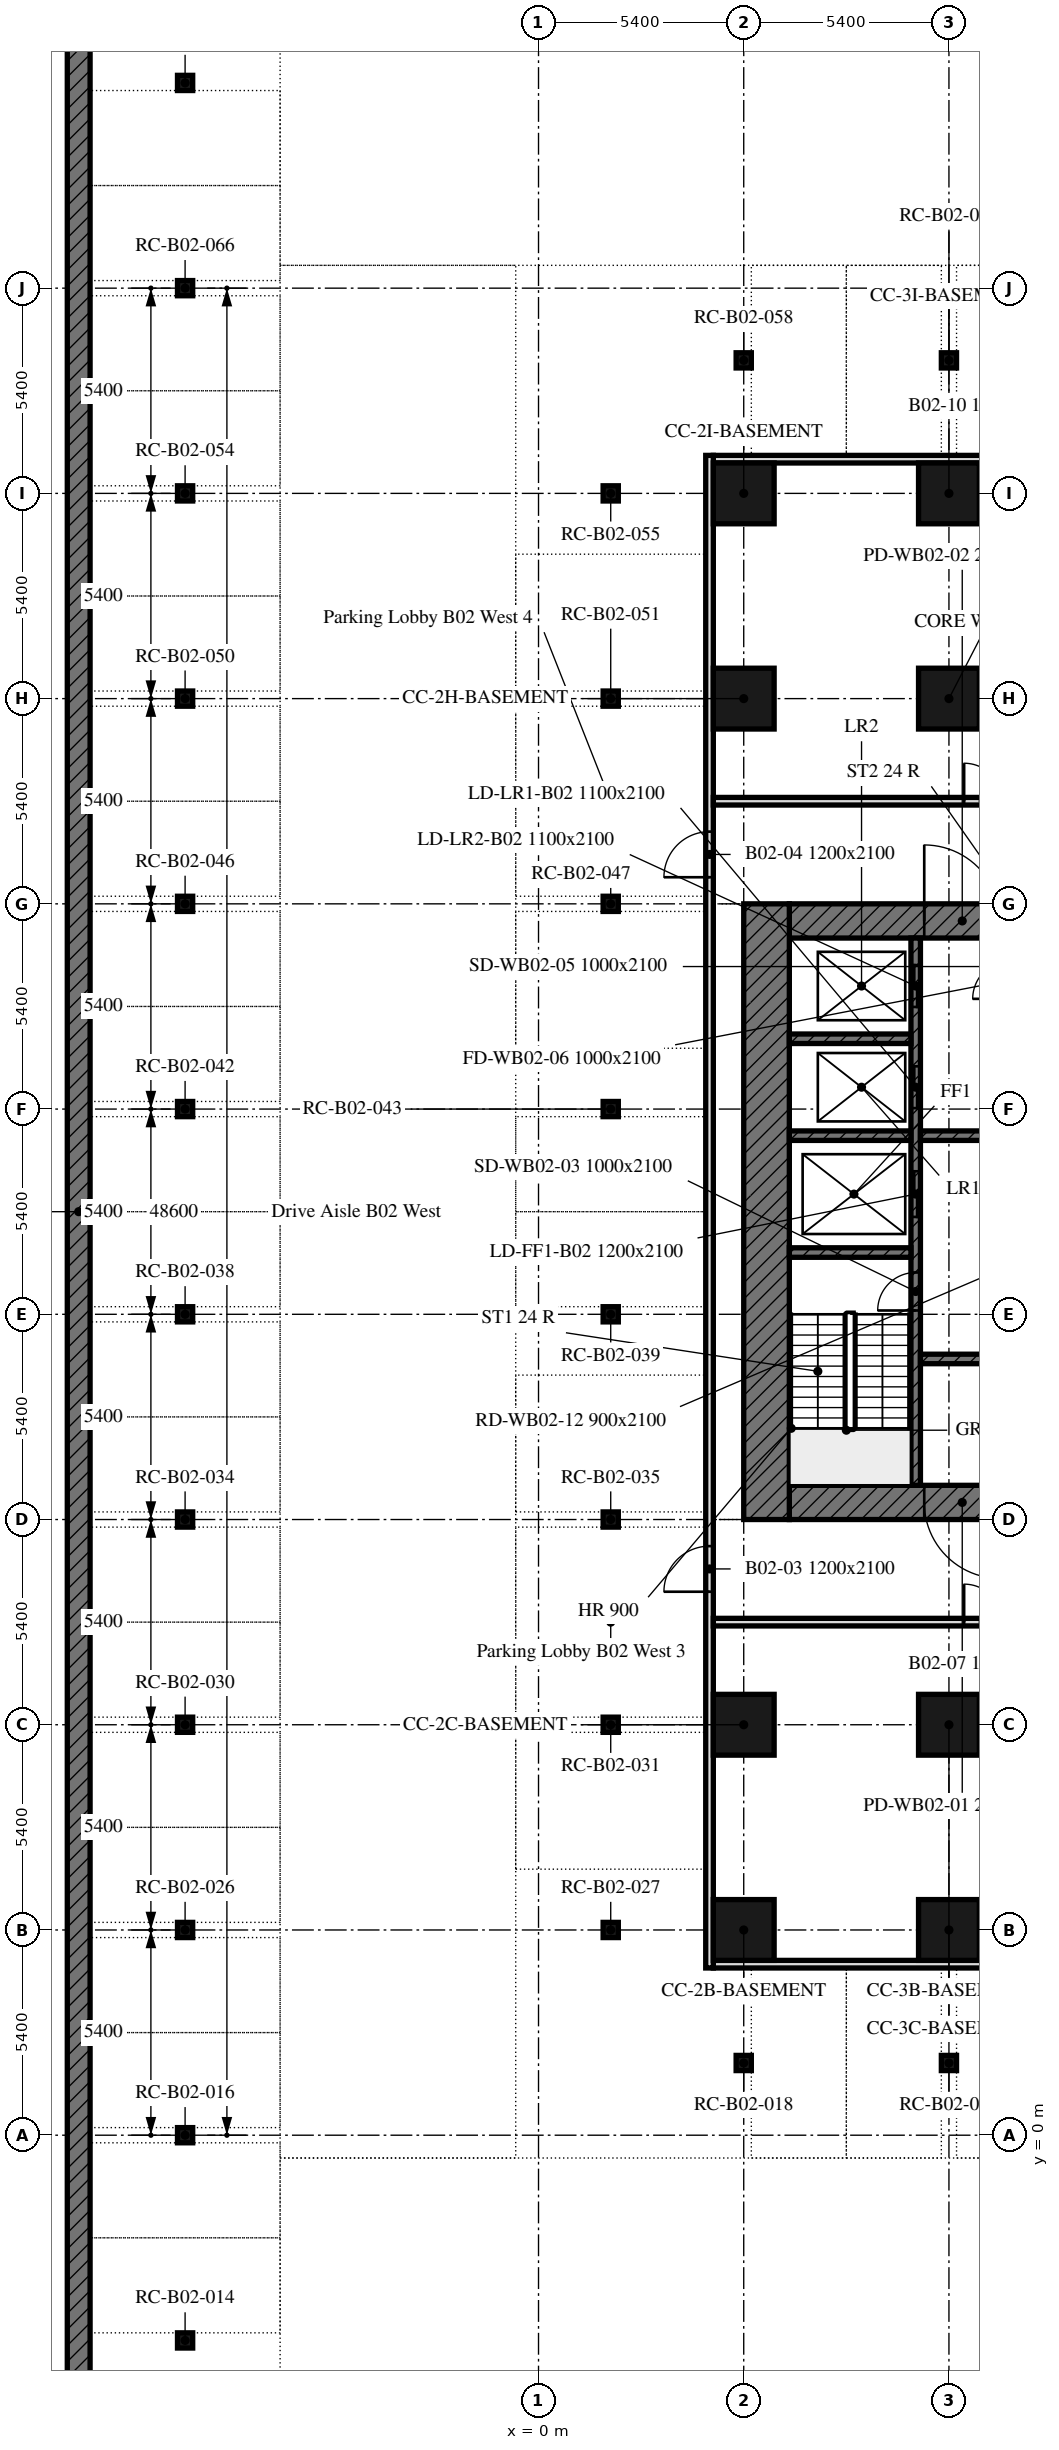
"""IFC4 building model, lengths in metres.
Left out: names, types, materials, properties, quantities, classifications, styles, units other than length and angle.
Written with IfcOpenShell. Run it as: python <this file> out.ifc"""

import sys

from ifc_helpers import new_model, si_unit, direction, frame, frame_2d, origin, origin_2d, place, context, subcontext, project, spatial, rectangle, extrude, element, fill, save


model = new_model("IFC4")
c1 = context("Model", 3, precision=1e-05, world=origin(), true_north=direction((0.0, 1.0)))
c2 = subcontext(c1, "Body", "Model", "MODEL_VIEW")
j1 = project(units=[si_unit("LENGTHUNIT", "METRE"), si_unit("PLANEANGLEUNIT", "RADIAN")], contexts=[c1])
p1 = place(None, origin())
s1 = spatial("IfcSite", under=j1, at=p1, CompositionType="ELEMENT")
p2 = place(p1, origin())
s2 = spatial("IfcBuilding", under=s1, at=p2, CompositionType="ELEMENT")
p3 = place(p2, frame((0.0, 0.0, -9.0)))
s3 = spatial("IfcBuildingStorey", under=s2, at=p3, CompositionType="ELEMENT", Elevation=-9.0)
p4 = place(p3, frame((-12.1, -12.4, 0.0), z_axis=(0.0, 0.0, 1.0), x_axis=(0.0, 1.0, 0.0)))
e1 = element("IfcWall", 1, at=p4, inside=s3, PredefinedType="SOLIDWALL", context=c2, shape_type="SweptSolid", body=[
    extrude(rectangle(XDim=73.4, YDim=0.6, at=frame_2d((36.7, 0.0))), origin(), (0.0, 0.0, 1.0), 4.1),
])
for number, where, z_axis, x_axis in (
    (2, (5.4, 5.4, 0.0), (0.0, 0.0, 1.0), (1.0, 0.0, 0.0)),
    (3, (10.8, 5.4, 0.0), (0.0, 0.0, 1.0), (1.0, 0.0, 0.0)),
    (4, (5.4, 10.8, 0.0), (0.0, 0.0, 1.0), (1.0, 0.0, 0.0)),
    (5, (10.8, 10.8, 0.0), (0.0, 0.0, 1.0), (1.0, 0.0, 0.0)),
    (6, (5.4, 37.8, 0.0), (0.0, 0.0, 1.0), (1.0, 0.0, 0.0)),
    (7, (10.8, 37.8, 0.0), (0.0, 0.0, 1.0), (1.0, 0.0, 0.0)),
    (8, (5.4, 43.2, 0.0), (0.0, 0.0, 1.0), (1.0, 0.0, 0.0)),
    (9, (10.8, 43.2, 0.0), (0.0, 0.0, 1.0), (1.0, 0.0, 0.0)),
):
    element("IfcColumn", number, at=place(p3, frame(where, z_axis=z_axis, x_axis=x_axis)), inside=s3, PredefinedType="COLUMN", context=c2, shape_type="SweptSolid", body=[
        extrude(rectangle(XDim=1.6, YDim=1.6, at=origin_2d()), origin(), (0.0, 0.0, 1.0), 4.1),
    ])
for number, where, z_axis, x_axis in (
    (10, (-9.3, -5.4, 0.0), (0.0, 0.0, 1.0), (1.0, 0.0, 0.0)),
    (11, (-9.3, 0.0, 0.0), (0.0, 0.0, 1.0), (1.0, 0.0, 0.0)),
    (12, (5.4, 1.9, 0.0), (0.0, 0.0, 1.0), (1.0, 0.0, 0.0)),
    (13, (10.8, 1.9, 0.0), (0.0, 0.0, 1.0), (1.0, 0.0, 0.0)),
    (14, (-9.3, 5.4, 0.0), (0.0, 0.0, 1.0), (1.0, 0.0, 0.0)),
    (15, (1.9, 5.4, 0.0), (0.0, 0.0, 1.0), (1.0, 0.0, 0.0)),
    (16, (-9.3, 10.8, 0.0), (0.0, 0.0, 1.0), (1.0, 0.0, 0.0)),
    (17, (1.9, 10.8, 0.0), (0.0, 0.0, 1.0), (1.0, 0.0, 0.0)),
    (18, (-9.3, 16.2, 0.0), (0.0, 0.0, 1.0), (1.0, 0.0, 0.0)),
    (19, (1.9, 16.2, 0.0), (0.0, 0.0, 1.0), (1.0, 0.0, 0.0)),
    (20, (-9.3, 21.6, 0.0), (0.0, 0.0, 1.0), (1.0, 0.0, 0.0)),
    (21, (1.9, 21.6, 0.0), (0.0, 0.0, 1.0), (1.0, 0.0, 0.0)),
    (22, (-9.3, 27.0, 0.0), (0.0, 0.0, 1.0), (1.0, 0.0, 0.0)),
    (23, (1.9, 27.0, 0.0), (0.0, 0.0, 1.0), (1.0, 0.0, 0.0)),
    (24, (-9.3, 32.4, 0.0), (0.0, 0.0, 1.0), (1.0, 0.0, 0.0)),
    (25, (1.9, 32.4, 0.0), (0.0, 0.0, 1.0), (1.0, 0.0, 0.0)),
    (26, (-9.3, 37.8, 0.0), (0.0, 0.0, 1.0), (1.0, 0.0, 0.0)),
    (27, (1.9, 37.8, 0.0), (0.0, 0.0, 1.0), (1.0, 0.0, 0.0)),
    (28, (-9.3, 43.2, 0.0), (0.0, 0.0, 1.0), (1.0, 0.0, 0.0)),
    (29, (1.9, 43.2, 0.0), (0.0, 0.0, 1.0), (1.0, 0.0, 0.0)),
    (30, (5.4, 46.7, 0.0), (0.0, 0.0, 1.0), (1.0, 0.0, 0.0)),
    (31, (10.8, 46.7, 0.0), (0.0, 0.0, 1.0), (1.0, 0.0, 0.0)),
    (32, (-9.3, 48.6, 0.0), (0.0, 0.0, 1.0), (1.0, 0.0, 0.0)),
    (33, (-9.3, 54.0, 0.0), (0.0, 0.0, 1.0), (1.0, 0.0, 0.0)),
):
    element("IfcColumn", number, at=place(p3, frame(where, z_axis=z_axis, x_axis=x_axis)), inside=s3, PredefinedType="COLUMN", context=c2, shape_type="SweptSolid", body=[
        extrude(rectangle(XDim=0.4, YDim=0.4, at=origin_2d()), origin(), (0.0, 0.0, 1.0), 4.1),
    ])
p5 = place(p3, frame((4.6, 4.5, 0.0), z_axis=(0.0, 0.0, 1.0), x_axis=(1.0, 0.0, 0.0)))
e34 = element("IfcWall", 34, at=p5, inside=s3, PredefinedType="PARTITIONING", context=c2, shape_type="SweptSolid", body=[
    extrude(rectangle(XDim=39.4, YDim=0.2, at=frame_2d((19.7, 0.0))), origin(), (0.0, 0.0, 1.0), 4.1),
])
p6 = place(p5, frame((18.3, 0.0, 0.0)))
e35 = element("IfcOpeningElement", 35, at=p6, cuts=e34, PredefinedType="OPENING", context=c2, shape_type="SweptSolid", body=[
    extrude(rectangle(XDim=1.2, YDim=2.1, at=frame_2d((0.6, 1.05))), frame((0.0, 0.11, 0.0), z_axis=(0.0, -1.0, 0.0), x_axis=(1.0, 0.0, 0.0)), (0.0, 0.0, 1.0), 0.22),
])
p7 = place(p3, frame((4.6, 44.1, 0.0), z_axis=(0.0, 0.0, 1.0), x_axis=(1.0, 0.0, 0.0)))
e36 = element("IfcWall", 36, at=p7, inside=s3, PredefinedType="PARTITIONING", context=c2, shape_type="SweptSolid", body=[
    extrude(rectangle(XDim=39.4, YDim=0.2, at=frame_2d((19.7, 0.0))), origin(), (0.0, 0.0, 1.0), 4.1),
])
p8 = place(p7, frame((23.4, 0.0, 0.0)))
e37 = element("IfcOpeningElement", 37, at=p8, cuts=e36, PredefinedType="OPENING", context=c2, shape_type="SweptSolid", body=[
    extrude(rectangle(XDim=1.2, YDim=2.1, at=frame_2d((0.6, 1.05))), frame((0.0, 0.11, 0.0), z_axis=(0.0, -1.0, 0.0), x_axis=(1.0, 0.0, 0.0)), (0.0, 0.0, 1.0), 0.22),
])
p9 = place(p3, frame((4.5, 4.4, 0.0), z_axis=(0.0, 0.0, 1.0), x_axis=(0.0, 1.0, 0.0)))
e38 = element("IfcWall", 38, at=p9, inside=s3, PredefinedType="PARTITIONING", context=c2, shape_type="SweptSolid", body=[
    extrude(rectangle(XDim=39.8, YDim=0.2, at=frame_2d((19.9, 0.0))), origin(), (0.0, 0.0, 1.0), 4.1),
])
p10 = place(p9, frame((9.9, 0.0, 0.0)))
e39 = element("IfcOpeningElement", 39, at=p10, cuts=e38, PredefinedType="OPENING", context=c2, shape_type="SweptSolid", body=[
    extrude(rectangle(XDim=1.2, YDim=2.1, at=frame_2d((0.6, 1.05))), frame((0.0, 0.11, 0.0), z_axis=(0.0, -1.0, 0.0), x_axis=(1.0, 0.0, 0.0)), (0.0, 0.0, 1.0), 0.22),
])
p11 = place(p9, frame((28.7, 0.0, 0.0)))
e40 = element("IfcOpeningElement", 40, at=p11, cuts=e38, PredefinedType="OPENING", context=c2, shape_type="SweptSolid", body=[
    extrude(rectangle(XDim=1.2, YDim=2.1, at=frame_2d((0.6, 1.05))), frame((0.0, 0.11, 0.0), z_axis=(0.0, -1.0, 0.0), x_axis=(1.0, 0.0, 0.0)), (0.0, 0.0, 1.0), 0.22),
])
p12 = place(p3, frame((4.6, 13.5, 0.0), z_axis=(0.0, 0.0, 1.0), x_axis=(1.0, 0.0, 0.0)))
e41 = element("IfcWall", 41, at=p12, inside=s3, PredefinedType="PARTITIONING", context=c2, shape_type="SweptSolid", body=[
    extrude(rectangle(XDim=14.2, YDim=0.2, at=frame_2d((7.1, 0.0))), origin(), (0.0, 0.0, 1.0), 4.1),
])
p13 = place(p12, frame((6.6, 0.0, 0.0)))
e42 = element("IfcOpeningElement", 42, at=p13, cuts=e41, PredefinedType="OPENING", context=c2, shape_type="SweptSolid", body=[
    extrude(rectangle(XDim=1.0, YDim=2.1, at=frame_2d((0.5, 1.05))), frame((0.0, 0.11, 0.0), z_axis=(0.0, -1.0, 0.0), x_axis=(1.0, 0.0, 0.0)), (0.0, 0.0, 1.0), 0.22),
])
p14 = place(p3, frame((4.6, 35.1, 0.0), z_axis=(0.0, 0.0, 1.0), x_axis=(1.0, 0.0, 0.0)))
e43 = element("IfcWall", 43, at=p14, inside=s3, PredefinedType="PARTITIONING", context=c2, shape_type="SweptSolid", body=[
    extrude(rectangle(XDim=14.2, YDim=0.2, at=frame_2d((7.1, 0.0))), origin(), (0.0, 0.0, 1.0), 4.1),
])
p15 = place(p14, frame((6.6, 0.0, 0.0)))
e44 = element("IfcOpeningElement", 44, at=p15, cuts=e43, PredefinedType="OPENING", context=c2, shape_type="SweptSolid", body=[
    extrude(rectangle(XDim=1.0, YDim=2.1, at=frame_2d((0.5, 1.05))), frame((0.0, 0.11, 0.0), z_axis=(0.0, -1.0, 0.0), x_axis=(1.0, 0.0, 0.0)), (0.0, 0.0, 1.0), 0.22),
])
p16 = place(p3, frame((17.7, 16.65, 0.0), z_axis=(0.0, 0.0, 1.0), x_axis=(-1.0, 0.0, 0.0)))
e45 = element("IfcWall", 45, at=p16, inside=s3, PredefinedType="SOLIDWALL", context=c2, shape_type="SweptSolid", body=[
    extrude(rectangle(XDim=11.1, YDim=0.9, at=frame_2d((5.55, 0.0))), origin(), (0.0, 0.0, 1.0), 4.1),
])
p17 = place(p16, frame((5.55, 0.0, 0.0)))
e46 = element("IfcOpeningElement", 46, at=p17, cuts=e45, PredefinedType="OPENING", context=c2, shape_type="SweptSolid", body=[
    extrude(rectangle(XDim=2.0, YDim=2.4, at=frame_2d((1.0, 1.2))), frame((0.0, 0.45, 0.0), z_axis=(0.0, -1.0, 0.0), x_axis=(1.0, 0.0, 0.0)), (0.0, 0.0, 1.0), 0.9),
])
p18 = place(p3, frame((6.6, 31.95, 0.0), z_axis=(0.0, 0.0, 1.0), x_axis=(1.0, 0.0, 0.0)))
e47 = element("IfcWall", 47, at=p18, inside=s3, PredefinedType="SOLIDWALL", context=c2, shape_type="SweptSolid", body=[
    extrude(rectangle(XDim=11.1, YDim=0.9, at=frame_2d((5.55, 0.0))), origin(), (0.0, 0.0, 1.0), 4.1),
])
p19 = place(p18, frame((3.55, 0.0, 0.0)))
e48 = element("IfcOpeningElement", 48, at=p19, cuts=e47, PredefinedType="OPENING", context=c2, shape_type="SweptSolid", body=[
    extrude(rectangle(XDim=2.0, YDim=2.4, at=frame_2d((1.0, 1.2))), frame((0.0, 0.45, 0.0), z_axis=(0.0, -1.0, 0.0), x_axis=(1.0, 0.0, 0.0)), (0.0, 0.0, 1.0), 0.9),
])
p20 = place(p3, frame((6.0, 16.2, 0.0), z_axis=(0.0, 0.0, 1.0), x_axis=(0.0, 1.0, 0.0)))
e49 = element("IfcWall", 49, at=p20, inside=s3, PredefinedType="SOLIDWALL", context=c2, shape_type="SweptSolid", body=[
    extrude(rectangle(XDim=16.2, YDim=1.2, at=frame_2d((8.1, 0.0))), origin(), (0.0, 0.0, 1.0), 4.1),
])
p21 = place(p3, frame((9.925, 17.1, 0.0), z_axis=(0.0, 0.0, 1.0), x_axis=(0.0, 1.0, 0.0)))
e50 = element("IfcWall", 50, at=p21, inside=s3, PredefinedType="SOLIDWALL", context=c2, shape_type="SweptSolid", body=[
    extrude(rectangle(XDim=14.4, YDim=0.25, at=frame_2d((7.2, 0.0))), origin(), (0.0, 0.0, 1.0), 4.1),
])
p22 = place(p21, frame((4.6, 0.0, 0.0)))
e51 = element("IfcOpeningElement", 51, at=p22, cuts=e50, PredefinedType="OPENING", context=c2, shape_type="SweptSolid", body=[
    extrude(rectangle(XDim=1.0, YDim=2.1, at=frame_2d((0.5, 1.05))), frame((0.0, 0.125, 0.0), z_axis=(0.0, -1.0, 0.0), x_axis=(1.0, 0.0, 0.0)), (0.0, 0.0, 1.0), 0.25),
])
p23 = place(p21, frame((7.062, 0.0, 0.0)))
e52 = element("IfcOpeningElement", 52, at=p23, cuts=e50, PredefinedType="OPENING", context=c2, shape_type="SweptSolid", body=[
    extrude(rectangle(XDim=1.2, YDim=2.1, at=frame_2d((0.6, 1.05))), frame((0.0, 0.125, 0.0), z_axis=(0.0, -1.0, 0.0), x_axis=(1.0, 0.0, 0.0)), (0.0, 0.0, 1.0), 0.25),
])
p24 = place(p21, frame((9.925, 0.0, 0.0)))
e53 = element("IfcOpeningElement", 53, at=p24, cuts=e50, PredefinedType="OPENING", context=c2, shape_type="SweptSolid", body=[
    extrude(rectangle(XDim=1.1, YDim=2.1, at=frame_2d((0.55, 1.05))), frame((0.0, 0.125, 0.0), z_axis=(0.0, -1.0, 0.0), x_axis=(1.0, 0.0, 0.0)), (0.0, 0.0, 1.0), 0.25),
])
p25 = place(p21, frame((12.587, 0.0, 0.0)))
e54 = element("IfcOpeningElement", 54, at=p25, cuts=e50, PredefinedType="OPENING", context=c2, shape_type="SweptSolid", body=[
    extrude(rectangle(XDim=1.1, YDim=2.1, at=frame_2d((0.55, 1.05))), frame((0.0, 0.125, 0.0), z_axis=(0.0, -1.0, 0.0), x_axis=(1.0, 0.0, 0.0)), (0.0, 0.0, 1.0), 0.25),
])
for number, where, z_axis, x_axis in (
    (55, (6.6, 23.225, 0.0), (0.0, 0.0, 1.0), (1.0, 0.0, 0.0)),
    (56, (6.6, 26.3, 0.0), (0.0, 0.0, 1.0), (1.0, 0.0, 0.0)),
):
    element("IfcWall", number, at=place(p3, frame(where, z_axis=z_axis, x_axis=x_axis)), inside=s3, PredefinedType="SOLIDWALL", context=c2, shape_type="SweptSolid", body=[
        extrude(rectangle(XDim=3.2, YDim=0.25, at=frame_2d((1.6, 0.0))), origin(), (0.0, 0.0, 1.0), 4.1),
    ])
for number, where, z_axis, x_axis in (
    (57, (10.05, 26.3, 0.0), (0.0, 0.0, 1.0), (1.0, 0.0, 0.0)),
    (58, (10.05, 20.425, 0.0), (0.0, 0.0, 1.0), (1.0, 0.0, 0.0)),
):
    element("IfcWall", number, at=place(p3, frame(where, z_axis=z_axis, x_axis=x_axis)), inside=s3, PredefinedType="SOLIDWALL", context=c2, shape_type="SweptSolid", body=[
        extrude(rectangle(XDim=2.75, YDim=0.25, at=frame_2d((1.375, 0.0))), origin(), (0.0, 0.0, 1.0), 4.1),
    ])
p26 = place(p3, frame((6.6, 28.85, 0.0), z_axis=(0.0, 0.0, 1.0), x_axis=(1.0, 0.0, 0.0)))
e59 = element("IfcWall", 59, at=p26, inside=s3, PredefinedType="SOLIDWALL", context=c2, shape_type="SweptSolid", body=[
    extrude(rectangle(XDim=3.2, YDim=0.25, at=frame_2d((1.6, 0.0))), origin(), (0.0, 0.0, 1.0), 4.1),
])
p27 = place(p10, origin())
e60 = element("IfcDoor", 60, at=p27, inside=s3, OperationType="SINGLE_SWING_LEFT", PredefinedType="DOOR", context=c2, shape_type="SweptSolid", body=[
    extrude(rectangle(XDim=1.2, YDim=2.1, at=frame_2d((0.6, 1.05))), frame((0.0, 0.025, 0.0), z_axis=(0.0, -1.0, 0.0), x_axis=(1.0, 0.0, 0.0)), (0.0, 0.0, 1.0), 0.05),
])
fill(e39, e60)
p28 = place(p11, origin())
e61 = element("IfcDoor", 61, at=p28, inside=s3, OperationType="SINGLE_SWING_LEFT", PredefinedType="DOOR", context=c2, shape_type="SweptSolid", body=[
    extrude(rectangle(XDim=1.2, YDim=2.1, at=frame_2d((0.6, 1.05))), frame((0.0, 0.025, 0.0), z_axis=(0.0, -1.0, 0.0), x_axis=(1.0, 0.0, 0.0)), (0.0, 0.0, 1.0), 0.05),
])
fill(e40, e61)
p29 = place(p13, origin())
e62 = element("IfcDoor", 62, at=p29, inside=s3, OperationType="SINGLE_SWING_LEFT", PredefinedType="DOOR", context=c2, shape_type="SweptSolid", body=[
    extrude(rectangle(XDim=1.0, YDim=2.1, at=frame_2d((0.5, 1.05))), frame((0.0, 0.025, 0.0), z_axis=(0.0, -1.0, 0.0), x_axis=(1.0, 0.0, 0.0)), (0.0, 0.0, 1.0), 0.05),
])
fill(e42, e62)
p30 = place(p15, origin())
e63 = element("IfcDoor", 63, at=p30, inside=s3, OperationType="SINGLE_SWING_LEFT", PredefinedType="DOOR", context=c2, shape_type="SweptSolid", body=[
    extrude(rectangle(XDim=1.0, YDim=2.1, at=frame_2d((0.5, 1.05))), frame((0.0, 0.025, 0.0), z_axis=(0.0, -1.0, 0.0), x_axis=(1.0, 0.0, 0.0)), (0.0, 0.0, 1.0), 0.05),
])
fill(e44, e63)
p31 = place(p17, origin())
e64 = element("IfcDoor", 64, at=p31, inside=s3, OperationType="DOUBLE_DOOR_SINGLE_SWING", PredefinedType="DOOR", context=c2, shape_type="SweptSolid", body=[
    extrude(rectangle(XDim=2.0, YDim=2.4, at=frame_2d((1.0, 1.2))), frame((0.0, 0.025, 0.0), z_axis=(0.0, -1.0, 0.0), x_axis=(1.0, 0.0, 0.0)), (0.0, 0.0, 1.0), 0.05),
])
fill(e46, e64)
p32 = place(p19, origin())
e65 = element("IfcDoor", 65, at=p32, inside=s3, OperationType="DOUBLE_DOOR_SINGLE_SWING", PredefinedType="DOOR", context=c2, shape_type="SweptSolid", body=[
    extrude(rectangle(XDim=2.0, YDim=2.4, at=frame_2d((1.0, 1.2))), frame((0.0, 0.025, 0.0), z_axis=(0.0, -1.0, 0.0), x_axis=(1.0, 0.0, 0.0)), (0.0, 0.0, 1.0), 0.05),
])
fill(e48, e65)
p33 = place(p22, origin())
e66 = element("IfcDoor", 66, at=p33, inside=s3, OperationType="SINGLE_SWING_LEFT", PredefinedType="DOOR", context=c2, shape_type="SweptSolid", body=[
    extrude(rectangle(XDim=1.0, YDim=2.1, at=frame_2d((0.5, 1.05))), frame((0.0, 0.025, 0.0), z_axis=(0.0, -1.0, 0.0), x_axis=(1.0, 0.0, 0.0)), (0.0, 0.0, 1.0), 0.05),
])
fill(e51, e66)
p34 = place(p23, origin())
e67 = element("IfcDoor", 67, at=p34, inside=s3, OperationType="DOUBLE_DOOR_SLIDING", PredefinedType="DOOR", context=c2, shape_type="SweptSolid", body=[
    extrude(rectangle(XDim=1.2, YDim=2.1, at=frame_2d((0.6, 1.05))), frame((0.0, 0.025, 0.0), z_axis=(0.0, -1.0, 0.0), x_axis=(1.0, 0.0, 0.0)), (0.0, 0.0, 1.0), 0.05),
])
fill(e52, e67)
p35 = place(p24, origin())
e68 = element("IfcDoor", 68, at=p35, inside=s3, OperationType="DOUBLE_DOOR_SLIDING", PredefinedType="DOOR", context=c2, shape_type="SweptSolid", body=[
    extrude(rectangle(XDim=1.1, YDim=2.1, at=frame_2d((0.55, 1.05))), frame((0.0, 0.025, 0.0), z_axis=(0.0, -1.0, 0.0), x_axis=(1.0, 0.0, 0.0)), (0.0, 0.0, 1.0), 0.05),
])
fill(e53, e68)
p36 = place(p25, origin())
e69 = element("IfcDoor", 69, at=p36, inside=s3, OperationType="DOUBLE_DOOR_SLIDING", PredefinedType="DOOR", context=c2, shape_type="SweptSolid", body=[
    extrude(rectangle(XDim=1.1, YDim=2.1, at=frame_2d((0.55, 1.05))), frame((0.0, 0.025, 0.0), z_axis=(0.0, -1.0, 0.0), x_axis=(1.0, 0.0, 0.0)), (0.0, 0.0, 1.0), 0.05),
])
fill(e54, e69)
save(model, sys.argv[1])
